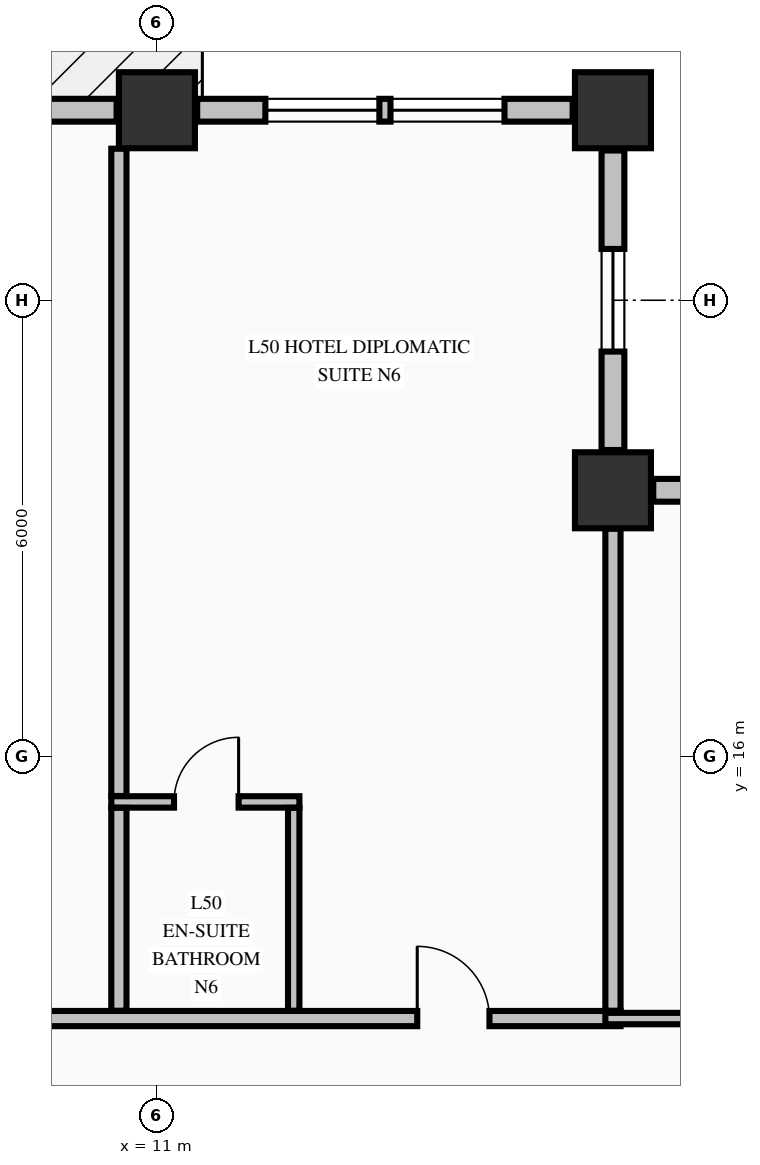
"""IFC4 building model, lengths in metres.
Left out: names, types, materials, properties, quantities, classifications, styles, units other than length and angle.
Written with IfcOpenShell. Run it as: python <this file> out.ifc"""

import sys

from ifc_helpers import new_model, si_unit, direction, frame, frame_2d, origin, origin_2d, place, context, subcontext, project, spatial, rectangle, extrude, element, fill, save


model = new_model("IFC4")
c1 = context("Model", 3, precision=1e-05, world=origin(), true_north=direction((0.0, 1.0)))
c2 = subcontext(c1, "Body", "Model", "MODEL_VIEW")
j1 = project(units=[si_unit("LENGTHUNIT", "METRE"), si_unit("PLANEANGLEUNIT", "RADIAN")], contexts=[c1])
p1 = place(None, origin())
s1 = spatial("IfcSite", under=j1, at=p1, CompositionType="ELEMENT")
p2 = place(p1, origin())
s2 = spatial("IfcBuilding", under=s1, at=p2, CompositionType="ELEMENT")
p3 = place(p2, frame((0.0, 0.0, 194.86)))
s3 = spatial("IfcBuildingStorey", under=s2, at=p3, CompositionType="ELEMENT", Elevation=194.86)
for number, where, z_axis, x_axis in (
    (1, (11.0, 24.5, -0.275), (0.0, 0.0, 1.0), (1.0, 0.0, 0.0)),
    (2, (17.0, 24.5, -0.275), (0.0, 0.0, 1.0), (1.0, 0.0, 0.0)),
    (3, (17.0, 19.5, -0.275), (0.0, 0.0, 1.0), (1.0, 0.0, 0.0)),
):
    element("IfcColumn", number, at=place(p3, frame(where, z_axis=z_axis, x_axis=x_axis)), inside=s3, PredefinedType="COLUMN", context=c2, shape_type="SweptSolid", body=[
        extrude(rectangle(XDim=1.0, YDim=1.0, at=origin_2d()), origin(), (0.0, 0.0, 1.0), 3.425),
    ])
p4 = place(p3, frame((21.47, 19.5, 0.0), z_axis=(0.0, 0.0, 1.0), x_axis=(-1.0, 0.0, 0.0)))
e4 = element("IfcWall", 4, at=p4, inside=s3, PredefinedType="STANDARD", context=c2, shape_type="SweptSolid", body=[
    extrude(rectangle(XDim=3.94, YDim=0.3, at=frame_2d((1.97, 0.0))), origin(), (0.0, 0.0, 1.0), 2.542),
])
p5 = place(p4, frame((1.295, 0.0, 0.68)))
e5 = element("IfcOpeningElement", 5, at=p5, cuts=e4, PredefinedType="OPENING", context=c2, shape_type="SweptSolid", body=[
    extrude(rectangle(XDim=1.35, YDim=1.42, at=frame_2d((0.675, 0.71))), frame((0.0, 0.16, 0.0), z_axis=(0.0, -1.0, 0.0), x_axis=(1.0, 0.0, 0.0)), (0.0, 0.0, 1.0), 0.32),
])
p6 = place(p3, frame((17.0, 20.03, 0.0), z_axis=(0.0, 0.0, 1.0), x_axis=(0.0, 1.0, 0.0)))
e6 = element("IfcWall", 6, at=p6, inside=s3, PredefinedType="STANDARD", context=c2, shape_type="SweptSolid", body=[
    extrude(rectangle(XDim=3.94, YDim=0.3, at=frame_2d((1.97, 0.0))), origin(), (0.0, 0.0, 1.0), 2.542),
])
p7 = place(p6, frame((1.295, 0.0, 0.68)))
e7 = element("IfcOpeningElement", 7, at=p7, cuts=e6, PredefinedType="OPENING", context=c2, shape_type="SweptSolid", body=[
    extrude(rectangle(XDim=1.35, YDim=1.42, at=frame_2d((0.675, 0.71))), frame((0.0, 0.16, 0.0), z_axis=(0.0, -1.0, 0.0), x_axis=(1.0, 0.0, 0.0)), (0.0, 0.0, 1.0), 0.32),
])
p8 = place(p3, frame((10.47, 24.5, 0.0), z_axis=(0.0, 0.0, 1.0), x_axis=(-1.0, 0.0, 0.0)))
e8 = element("IfcWall", 8, at=p8, inside=s3, PredefinedType="STANDARD", context=c2, shape_type="SweptSolid", body=[
    extrude(rectangle(XDim=9.94, YDim=0.3, at=frame_2d((4.97, 0.0))), origin(), (0.0, 0.0, 1.0), 2.542),
])
p9 = place(p8, frame((1.238, 0.0, 0.72)))
e9 = element("IfcOpeningElement", 9, at=p9, cuts=e8, PredefinedType="OPENING", context=c2, shape_type="SweptSolid", body=[
    extrude(rectangle(XDim=1.5, YDim=1.6, at=frame_2d((0.75, 0.8))), frame((0.0, 0.16, 0.0), z_axis=(0.0, -1.0, 0.0), x_axis=(1.0, 0.0, 0.0)), (0.0, 0.0, 1.0), 0.32),
])
p10 = place(p8, frame((3.226, 0.0, 0.72)))
e10 = element("IfcOpeningElement", 10, at=p10, cuts=e8, PredefinedType="OPENING", context=c2, shape_type="SweptSolid", body=[
    extrude(rectangle(XDim=1.5, YDim=1.6, at=frame_2d((0.75, 0.8))), frame((0.0, 0.16, 0.0), z_axis=(0.0, -1.0, 0.0), x_axis=(1.0, 0.0, 0.0)), (0.0, 0.0, 1.0), 0.32),
])
p11 = place(p8, frame((7.202, 0.0, 0.72)))
e11 = element("IfcOpeningElement", 11, at=p11, cuts=e8, PredefinedType="OPENING", context=c2, shape_type="SweptSolid", body=[
    extrude(rectangle(XDim=1.5, YDim=1.6, at=frame_2d((0.75, 0.8))), frame((0.0, 0.16, 0.0), z_axis=(0.0, -1.0, 0.0), x_axis=(1.0, 0.0, 0.0)), (0.0, 0.0, 1.0), 0.32),
])
p12 = place(p3, frame((16.47, 24.5, 0.0), z_axis=(0.0, 0.0, 1.0), x_axis=(-1.0, 0.0, 0.0)))
e12 = element("IfcWall", 12, at=p12, inside=s3, PredefinedType="STANDARD", context=c2, shape_type="SweptSolid", body=[
    extrude(rectangle(XDim=4.94, YDim=0.3, at=frame_2d((2.47, 0.0))), origin(), (0.0, 0.0, 1.0), 2.542),
])
p13 = place(p12, frame((0.897, 0.0, 0.72)))
e13 = element("IfcOpeningElement", 13, at=p13, cuts=e12, PredefinedType="OPENING", context=c2, shape_type="SweptSolid", body=[
    extrude(rectangle(XDim=1.5, YDim=1.6, at=frame_2d((0.75, 0.8))), frame((0.0, 0.16, 0.0), z_axis=(0.0, -1.0, 0.0), x_axis=(1.0, 0.0, 0.0)), (0.0, 0.0, 1.0), 0.32),
])
p14 = place(p12, frame((2.543, 0.0, 0.72)))
e14 = element("IfcOpeningElement", 14, at=p14, cuts=e12, PredefinedType="OPENING", context=c2, shape_type="SweptSolid", body=[
    extrude(rectangle(XDim=1.5, YDim=1.6, at=frame_2d((0.75, 0.8))), frame((0.0, 0.16, 0.0), z_axis=(0.0, -1.0, 0.0), x_axis=(1.0, 0.0, 0.0)), (0.0, 0.0, 1.0), 0.32),
])
p15 = place(p3, frame((-22.1, 12.55, 0.0), z_axis=(0.0, 0.0, 1.0), x_axis=(1.0, 0.0, 0.0)))
e15 = element("IfcWall", 15, at=p15, inside=s3, PredefinedType="PARTITIONING", context=c2, shape_type="SweptSolid", body=[
    extrude(rectangle(XDim=39.2, YDim=0.2, at=frame_2d((19.6, 0.0))), origin(), (0.0, 0.0, 1.0), 3.15),
])
p16 = place(p15, frame((4.925, 0.0, 0.0)))
e16 = element("IfcOpeningElement", 16, at=p16, cuts=e15, PredefinedType="OPENING", context=c2, shape_type="SweptSolid", body=[
    extrude(rectangle(XDim=0.95, YDim=2.15, at=frame_2d((0.475, 1.075))), frame((0.0, 0.11, 0.0), z_axis=(0.0, -1.0, 0.0), x_axis=(1.0, 0.0, 0.0)), (0.0, 0.0, 1.0), 0.22),
])
p17 = place(p15, frame((12.375, 0.0, 0.0)))
e17 = element("IfcOpeningElement", 17, at=p17, cuts=e15, PredefinedType="OPENING", context=c2, shape_type="SweptSolid", body=[
    extrude(rectangle(XDim=0.95, YDim=2.15, at=frame_2d((0.475, 1.075))), frame((0.0, 0.11, 0.0), z_axis=(0.0, -1.0, 0.0), x_axis=(1.0, 0.0, 0.0)), (0.0, 0.0, 1.0), 0.22),
])
p18 = place(p15, frame((18.575, 0.0, 0.0)))
e18 = element("IfcOpeningElement", 18, at=p18, cuts=e15, PredefinedType="OPENING", context=c2, shape_type="SweptSolid", body=[
    extrude(rectangle(XDim=0.95, YDim=2.15, at=frame_2d((0.475, 1.075))), frame((0.0, 0.11, 0.0), z_axis=(0.0, -1.0, 0.0), x_axis=(1.0, 0.0, 0.0)), (0.0, 0.0, 1.0), 0.22),
])
p19 = place(p15, frame((24.475, 0.0, 0.0)))
e19 = element("IfcOpeningElement", 19, at=p19, cuts=e15, PredefinedType="OPENING", context=c2, shape_type="SweptSolid", body=[
    extrude(rectangle(XDim=0.95, YDim=2.15, at=frame_2d((0.475, 1.075))), frame((0.0, 0.11, 0.0), z_axis=(0.0, -1.0, 0.0), x_axis=(1.0, 0.0, 0.0)), (0.0, 0.0, 1.0), 0.22),
])
p20 = place(p15, frame((30.375, 0.0, 0.0)))
e20 = element("IfcOpeningElement", 20, at=p20, cuts=e15, PredefinedType="OPENING", context=c2, shape_type="SweptSolid", body=[
    extrude(rectangle(XDim=0.95, YDim=2.15, at=frame_2d((0.475, 1.075))), frame((0.0, 0.11, 0.0), z_axis=(0.0, -1.0, 0.0), x_axis=(1.0, 0.0, 0.0)), (0.0, 0.0, 1.0), 0.22),
])
p21 = place(p15, frame((36.525, 0.0, 0.0)))
e21 = element("IfcOpeningElement", 21, at=p21, cuts=e15, PredefinedType="OPENING", context=c2, shape_type="SweptSolid", body=[
    extrude(rectangle(XDim=0.95, YDim=2.15, at=frame_2d((0.475, 1.075))), frame((0.0, 0.11, 0.0), z_axis=(0.0, -1.0, 0.0), x_axis=(1.0, 0.0, 0.0)), (0.0, 0.0, 1.0), 0.22),
])
p22 = place(p3, frame((16.9, 12.55, 0.0), z_axis=(0.0, 0.0, 1.0), x_axis=(1.0, 0.0, 0.0)))
e22 = element("IfcWall", 22, at=p22, inside=s3, PredefinedType="PARTITIONING", context=c2, shape_type="SweptSolid", body=[
    extrude(rectangle(XDim=3.175, YDim=0.15, at=frame_2d((1.587, 0.0))), origin(), (0.0, 0.0, 1.0), 3.15),
])
p23 = place(p3, frame((10.4, 15.4, 0.0), z_axis=(0.0, 0.0, 1.0), x_axis=(1.0, 0.0, 0.0)))
e23 = element("IfcWall", 23, at=p23, inside=s3, PredefinedType="PARTITIONING", context=c2, shape_type="SweptSolid", body=[
    extrude(rectangle(XDim=2.475, YDim=0.15, at=frame_2d((1.238, 0.0))), origin(), (0.0, 0.0, 1.0), 3.15),
])
p24 = place(p23, frame((0.825, 0.0, 0.0)))
e24 = element("IfcOpeningElement", 24, at=p24, cuts=e23, PredefinedType="OPENING", context=c2, shape_type="SweptSolid", body=[
    extrude(rectangle(XDim=0.85, YDim=2.1, at=frame_2d((0.425, 1.05))), frame((0.0, 0.085, 0.0), z_axis=(0.0, -1.0, 0.0), x_axis=(1.0, 0.0, 0.0)), (0.0, 0.0, 1.0), 0.17),
])
p25 = place(p3, frame((10.5, 12.653, 0.0), z_axis=(0.0, 0.0, 1.0), x_axis=(0.0, 1.0, 0.0)))
e25 = element("IfcWall", 25, at=p25, inside=s3, PredefinedType="PARTITIONING", context=c2, shape_type="SweptSolid", body=[
    extrude(rectangle(XDim=2.669, YDim=0.2, at=frame_2d((1.334, 0.0))), origin(), (0.0, 0.0, 1.0), 3.15),
])
p26 = place(p3, frame((10.5, 15.478, 0.0), z_axis=(0.0, 0.0, 1.0), x_axis=(0.0, 1.0, 0.0)))
e26 = element("IfcWall", 26, at=p26, inside=s3, PredefinedType="PARTITIONING", context=c2, shape_type="SweptSolid", body=[
    extrude(rectangle(XDim=8.516, YDim=0.2, at=frame_2d((4.258, 0.0))), origin(), (0.0, 0.0, 1.0), 3.15),
])
p27 = place(p3, frame((12.8, 12.653, 0.0), z_axis=(0.0, 0.0, 1.0), x_axis=(0.0, 1.0, 0.0)))
e27 = element("IfcWall", 27, at=p27, inside=s3, PredefinedType="PARTITIONING", context=c2, shape_type="SweptSolid", body=[
    extrude(rectangle(XDim=2.669, YDim=0.15, at=frame_2d((1.334, 0.0))), origin(), (0.0, 0.0, 1.0), 3.15),
])
p28 = place(p3, frame((17.0, 12.653, 0.0), z_axis=(0.0, 0.0, 1.0), x_axis=(0.0, 1.0, 0.0)))
e28 = element("IfcWall", 28, at=p28, inside=s3, PredefinedType="PARTITIONING", context=c2, shape_type="SweptSolid", body=[
    extrude(rectangle(XDim=6.341, YDim=0.2, at=frame_2d((3.17, 0.0))), origin(), (0.0, 0.0, 1.0), 3.15),
])
p29 = place(p7, origin())
e29 = element("IfcWindow", 29, at=p29, inside=s3, PartitioningType="SINGLE_PANEL", PredefinedType="WINDOW", context=c2, shape_type="SweptSolid", body=[
    extrude(rectangle(XDim=1.35, YDim=1.42, at=frame_2d((0.675, 0.71))), frame((0.0, 0.03, 0.0), z_axis=(0.0, -1.0, 0.0), x_axis=(1.0, 0.0, 0.0)), (0.0, 0.0, 1.0), 0.06),
])
fill(e7, e29)
p30 = place(p13, origin())
e30 = element("IfcWindow", 30, at=p30, inside=s3, PartitioningType="SINGLE_PANEL", PredefinedType="WINDOW", context=c2, shape_type="SweptSolid", body=[
    extrude(rectangle(XDim=1.5, YDim=1.6, at=frame_2d((0.75, 0.8))), frame((0.0, 0.03, 0.0), z_axis=(0.0, -1.0, 0.0), x_axis=(1.0, 0.0, 0.0)), (0.0, 0.0, 1.0), 0.06),
])
fill(e13, e30)
p31 = place(p14, origin())
e31 = element("IfcWindow", 31, at=p31, inside=s3, PartitioningType="SINGLE_PANEL", PredefinedType="WINDOW", context=c2, shape_type="SweptSolid", body=[
    extrude(rectangle(XDim=1.5, YDim=1.6, at=frame_2d((0.75, 0.8))), frame((0.0, 0.03, 0.0), z_axis=(0.0, -1.0, 0.0), x_axis=(1.0, 0.0, 0.0)), (0.0, 0.0, 1.0), 0.06),
])
fill(e14, e31)
p32 = place(p21, origin())
e32 = element("IfcDoor", 32, at=p32, inside=s3, OperationType="SINGLE_SWING_LEFT", PredefinedType="DOOR", context=c2, shape_type="SweptSolid", body=[
    extrude(rectangle(XDim=0.95, YDim=2.15, at=frame_2d((0.475, 1.075))), frame((0.0, 0.025, 0.0), z_axis=(0.0, -1.0, 0.0), x_axis=(1.0, 0.0, 0.0)), (0.0, 0.0, 1.0), 0.05),
])
fill(e21, e32)
p33 = place(p24, origin())
e33 = element("IfcDoor", 33, at=p33, inside=s3, OperationType="SINGLE_SWING_RIGHT", PredefinedType="DOOR", context=c2, shape_type="SweptSolid", body=[
    extrude(rectangle(XDim=0.85, YDim=2.1, at=frame_2d((0.425, 1.05))), frame((0.0, 0.025, 0.0), z_axis=(0.0, -1.0, 0.0), x_axis=(1.0, 0.0, 0.0)), (0.0, 0.0, 1.0), 0.05),
])
fill(e24, e33)
save(model, sys.argv[1])
